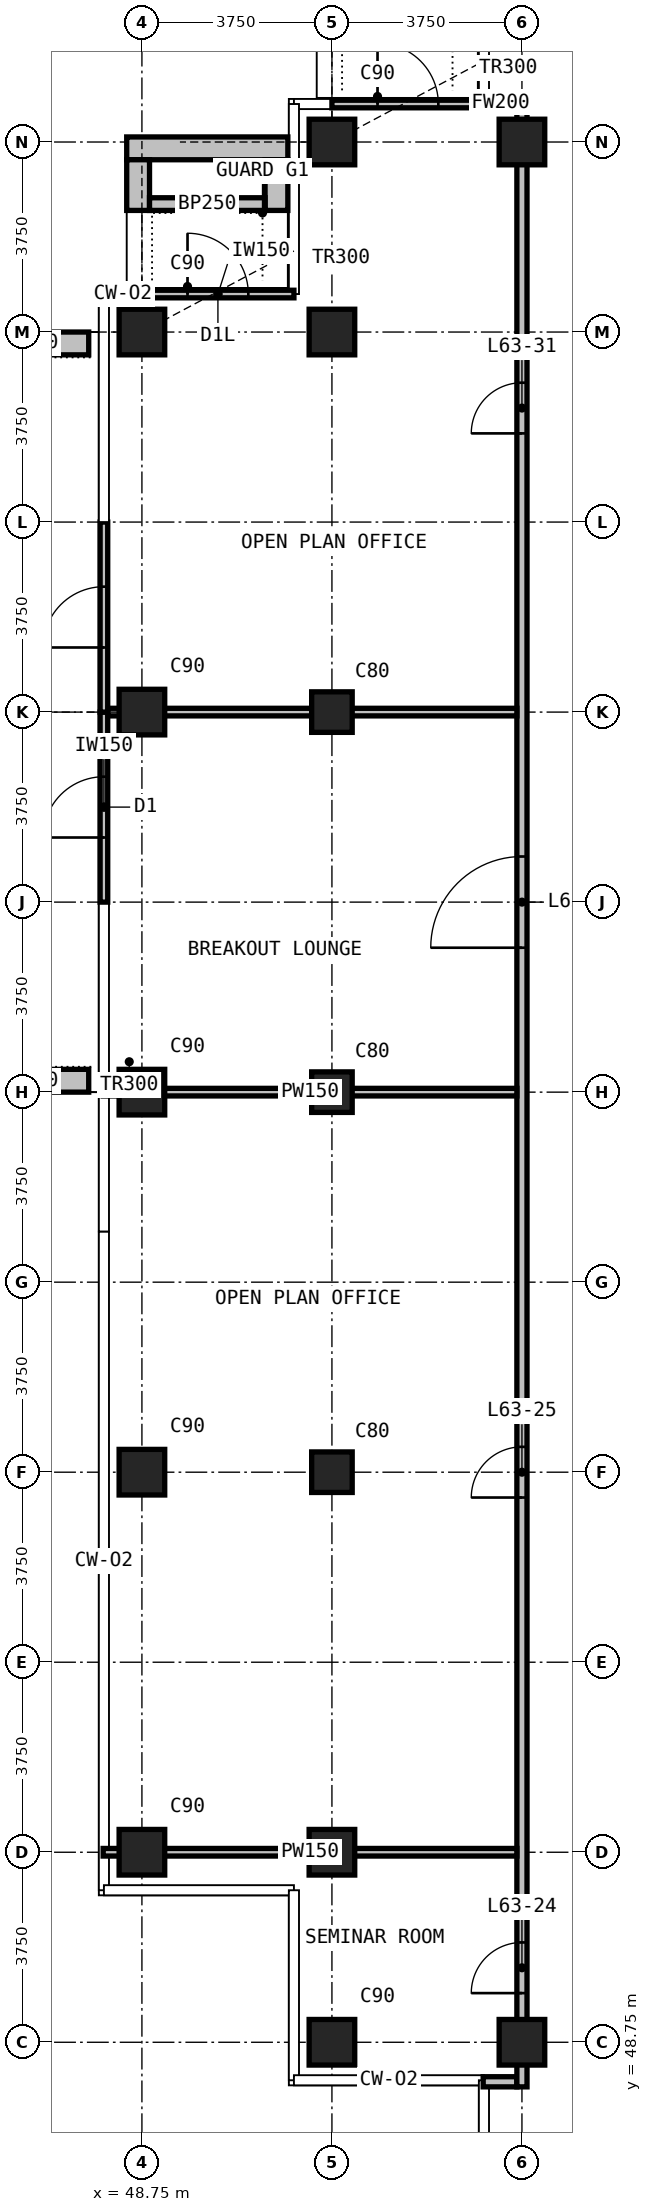
"""IFC4 building model, lengths in metres.
Left out: names, types, materials, properties, quantities, classifications, styles, units other than length and angle.
Written with IfcOpenShell. Run it as: python <this file> out.ifc"""

import sys

from ifc_helpers import new_model, si_unit, direction, frame, frame_2d, origin, origin_2d, place, context, subcontext, project, spatial, rectangle, extrude, element, fill, save


model = new_model("IFC4")
c1 = context("Model", 3, precision=1e-05, world=origin(), true_north=direction((0.0, 1.0)))
c2 = subcontext(c1, "Body", "Model", "MODEL_VIEW")
j1 = project(units=[si_unit("LENGTHUNIT", "METRE"), si_unit("PLANEANGLEUNIT", "RADIAN")], contexts=[c1])
p1 = place(None, origin())
s1 = spatial("IfcSite", under=j1, at=p1, CompositionType="ELEMENT")
p2 = place(p1, origin())
s2 = spatial("IfcBuilding", under=s1, at=p2, CompositionType="ELEMENT")
p3 = place(p2, frame((0.0, 0.0, 242.7)))
s3 = spatial("IfcBuildingStorey", under=s2, at=p3, CompositionType="ELEMENT", Elevation=242.7)
for number, where, z_axis, x_axis in (
    (1, (48.75, 52.5, 0.0), (0.0, 0.0, 1.0), (1.0, 0.0, 0.0)),
    (2, (48.75, 60.0, 0.0), (0.0, 0.0, 1.0), (1.0, 0.0, 0.0)),
    (3, (48.75, 67.5, 0.0), (0.0, 0.0, 1.0), (1.0, 0.0, 0.0)),
    (4, (48.75, 75.0, 0.0), (0.0, 0.0, 1.0), (1.0, 0.0, 0.0)),
    (5, (48.75, 82.5, 0.0), (0.0, 0.0, 1.0), (1.0, 0.0, 0.0)),
    (6, (52.5, 48.75, 0.0), (0.0, 0.0, 1.0), (1.0, 0.0, 0.0)),
    (7, (52.5, 52.5, 0.0), (0.0, 0.0, 1.0), (1.0, 0.0, 0.0)),
):
    element("IfcColumn", number, at=place(p3, frame(where, z_axis=z_axis, x_axis=x_axis)), inside=s3, PredefinedType="COLUMN", context=c2, shape_type="SweptSolid", body=[
        extrude(rectangle(XDim=0.9, YDim=0.9, at=origin_2d()), origin(), (0.0, 0.0, 1.0), 3.6),
    ])
for number, where, z_axis, x_axis in (
    (8, (52.5, 60.0, 0.0), (0.0, 0.0, 1.0), (1.0, 0.0, 0.0)),
    (9, (52.5, 67.5, 0.0), (0.0, 0.0, 1.0), (1.0, 0.0, 0.0)),
    (10, (52.5, 75.0, 0.0), (0.0, 0.0, 1.0), (1.0, 0.0, 0.0)),
):
    element("IfcColumn", number, at=place(p3, frame(where, z_axis=z_axis, x_axis=x_axis)), inside=s3, PredefinedType="COLUMN", context=c2, shape_type="SweptSolid", body=[
        extrude(rectangle(XDim=0.8, YDim=0.8, at=origin_2d()), origin(), (0.0, 0.0, 1.0), 3.6),
    ])
for number, where, z_axis, x_axis in (
    (11, (52.5, 82.5, 0.0), (0.0, 0.0, 1.0), (1.0, 0.0, 0.0)),
    (12, (52.5, 86.25, 0.0), (0.0, 0.0, 1.0), (1.0, 0.0, 0.0)),
    (13, (56.25, 48.75, 0.0), (0.0, 0.0, 1.0), (1.0, 0.0, 0.0)),
    (14, (56.25, 86.25, 0.0), (0.0, 0.0, 1.0), (1.0, 0.0, 0.0)),
):
    element("IfcColumn", number, at=place(p3, frame(where, z_axis=z_axis, x_axis=x_axis)), inside=s3, PredefinedType="COLUMN", context=c2, shape_type="SweptSolid", body=[
        extrude(rectangle(XDim=0.9, YDim=0.9, at=origin_2d()), origin(), (0.0, 0.0, 1.0), 3.6),
    ])
p4 = place(p3, frame((52.5, 87.0, 0.0), z_axis=(0.0, 0.0, 1.0), x_axis=(1.0, 0.0, 0.0)))
e15 = element("IfcWall", 15, at=p4, inside=s3, PredefinedType="SOLIDWALL", context=c2, shape_type="SweptSolid", body=[
    extrude(rectangle(XDim=3.0, YDim=0.15, at=frame_2d((1.5, 0.0))), origin(), (0.0, 0.0, 1.0), 3.3),
])
p5 = place(p4, frame((0.9, 0.0, 0.0)))
e16 = element("IfcOpeningElement", 16, at=p5, cuts=e15, PredefinedType="OPENING", context=c2, shape_type="SweptSolid", body=[
    extrude(rectangle(XDim=1.2, YDim=2.0, at=frame_2d((0.6, 1.0))), frame((0.0, 0.085, 0.0), z_axis=(0.0, -1.0, 0.0), x_axis=(1.0, 0.0, 0.0)), (0.0, 0.0, 1.0), 0.17),
])
p6 = place(p3, frame((48.75, 83.25, 0.0), z_axis=(0.0, 0.0, 1.0), x_axis=(1.0, 0.0, 0.0)))
e17 = element("IfcWall", 17, at=p6, inside=s3, PredefinedType="SOLIDWALL", context=c2, shape_type="SweptSolid", body=[
    extrude(rectangle(XDim=3.0, YDim=0.15, at=frame_2d((1.5, 0.0))), origin(), (0.0, 0.0, 1.0), 3.3),
])
p7 = place(p6, frame((0.9, 0.0, 0.0)))
e18 = element("IfcOpeningElement", 18, at=p7, cuts=e17, PredefinedType="OPENING", context=c2, shape_type="SweptSolid", body=[
    extrude(rectangle(XDim=1.2, YDim=2.0, at=frame_2d((0.6, 1.0))), frame((0.0, 0.085, 0.0), z_axis=(0.0, -1.0, 0.0), x_axis=(1.0, 0.0, 0.0)), (0.0, 0.0, 1.0), 0.17),
])
p8 = place(p3, frame((48.0, 71.25, 0.0), z_axis=(0.0, 0.0, 1.0), x_axis=(0.0, 1.0, 0.0)))
e19 = element("IfcWall", 19, at=p8, inside=s3, PredefinedType="SOLIDWALL", context=c2, shape_type="SweptSolid", body=[
    extrude(rectangle(XDim=3.75, YDim=0.15, at=frame_2d((1.875, 0.0))), origin(), (0.0, 0.0, 1.0), 3.3),
])
p9 = place(p8, frame((1.275, 0.0, 0.0)))
e20 = element("IfcOpeningElement", 20, at=p9, cuts=e19, PredefinedType="OPENING", context=c2, shape_type="SweptSolid", body=[
    extrude(rectangle(XDim=1.2, YDim=2.4, at=frame_2d((0.6, 1.2))), frame((0.0, 0.085, 0.0), z_axis=(0.0, -1.0, 0.0), x_axis=(1.0, 0.0, 0.0)), (0.0, 0.0, 1.0), 0.17),
])
p10 = place(p3, frame((48.0, 75.0, 0.0), z_axis=(0.0, 0.0, 1.0), x_axis=(0.0, 1.0, 0.0)))
e21 = element("IfcWall", 21, at=p10, inside=s3, PredefinedType="SOLIDWALL", context=c2, shape_type="SweptSolid", body=[
    extrude(rectangle(XDim=3.75, YDim=0.15, at=frame_2d((1.875, 0.0))), origin(), (0.0, 0.0, 1.0), 3.3),
])
p11 = place(p10, frame((1.275, 0.0, 0.0)))
e22 = element("IfcOpeningElement", 22, at=p11, cuts=e21, PredefinedType="OPENING", context=c2, shape_type="SweptSolid", body=[
    extrude(rectangle(XDim=1.2, YDim=2.4, at=frame_2d((0.6, 1.2))), frame((0.0, 0.085, 0.0), z_axis=(0.0, -1.0, 0.0), x_axis=(1.0, 0.0, 0.0)), (0.0, 0.0, 1.0), 0.17),
])
p12 = place(p3, frame((48.45, 86.125, 0.0), z_axis=(0.0, 0.0, 1.0), x_axis=(1.0, 0.0, 0.0)))
e23 = element("IfcWall", 23, at=p12, inside=s3, PredefinedType="USERDEFINED", context=c2, shape_type="SweptSolid", body=[
    extrude(rectangle(XDim=3.18, YDim=0.45, at=frame_2d((1.59, 0.0))), origin(), (0.0, 0.0, 1.0), 1.1),
])
for number, where, z_axis, x_axis in (
    (24, (48.675, 84.9, 0.0), (0.0, 0.0, 1.0), (0.0, 1.0, 0.0)),
    (25, (51.405, 84.9, 0.0), (0.0, 0.0, 1.0), (0.0, 1.0, 0.0)),
):
    element("IfcWall", number, at=place(p3, frame(where, z_axis=z_axis, x_axis=x_axis)), inside=s3, PredefinedType="USERDEFINED", context=c2, shape_type="SweptSolid", body=[
        extrude(rectangle(XDim=1.0, YDim=0.45, at=frame_2d((0.5, 0.0))), origin(), (0.0, 0.0, 1.0), 1.1),
    ])
p13 = place(p3, frame((48.9, 85.025, 0.0), z_axis=(0.0, 0.0, 1.0), x_axis=(1.0, 0.0, 0.0)))
e26 = element("IfcWall", 26, at=p13, inside=s3, PredefinedType="USERDEFINED", context=c2, shape_type="SweptSolid", body=[
    extrude(rectangle(XDim=2.28, YDim=0.25, at=frame_2d((1.14, 0.0))), origin(), (0.0, 0.0, 1.0), 1.0),
])
for number, where, z_axis, x_axis in (
    (27, (47.7, 67.725, 0.0), (0.0, 0.0, 1.0), (-1.0, 0.0, 0.0)),
    (28, (47.7, 82.275, 0.0), (0.0, 0.0, 1.0), (-1.0, 0.0, 0.0)),
):
    element("IfcWall", number, at=place(p3, frame(where, z_axis=z_axis, x_axis=x_axis)), inside=s3, PredefinedType="USERDEFINED", context=c2, shape_type="SweptSolid", body=[
        extrude(rectangle(XDim=2.35, YDim=0.45, at=frame_2d((1.175, 0.0))), origin(), (0.0, 0.0, 1.0), 1.1),
    ])
p14 = place(p3, frame((55.485, 47.97, 0.0), z_axis=(0.0, 0.0, 1.0), x_axis=(1.0, 0.0, 0.0)))
e29 = element("IfcWall", 29, at=p14, inside=s3, PredefinedType="PARTITIONING", context=c2, shape_type="SweptSolid", body=[
    extrude(rectangle(XDim=0.665, YDim=0.2, at=frame_2d((0.333, 0.0))), origin(), (0.0, 0.0, 1.0), 3.3),
])
p15 = place(p3, frame((55.51, 87.03, 0.0), z_axis=(0.0, 0.0, 1.0), x_axis=(1.0, 0.0, 0.0)))
e30 = element("IfcWall", 30, at=p15, inside=s3, PredefinedType="PARTITIONING", context=c2, shape_type="SweptSolid", body=[
    extrude(rectangle(XDim=0.64, YDim=0.2, at=frame_2d((0.32, 0.0))), origin(), (0.0, 0.0, 1.0), 3.3),
])
p16 = place(p3, frame((56.25, 47.87, 0.0), z_axis=(0.0, 0.0, 1.0), x_axis=(0.0, 1.0, 0.0)))
e31 = element("IfcWall", 31, at=p16, inside=s3, PredefinedType="PARTITIONING", context=c2, shape_type="SweptSolid", body=[
    extrude(rectangle(XDim=39.26, YDim=0.2, at=frame_2d((19.63, 0.0))), origin(), (0.0, 0.0, 1.0), 3.3),
])
p17 = place(p16, frame((1.85, 0.0, 0.0)))
e32 = element("IfcOpeningElement", 32, at=p17, cuts=e31, PredefinedType="OPENING", context=c2, shape_type="SweptSolid", body=[
    extrude(rectangle(XDim=1.0, YDim=2.2, at=frame_2d((0.5, 1.1))), frame((0.0, 0.11, 0.0), z_axis=(0.0, -1.0, 0.0), x_axis=(1.0, 0.0, 0.0)), (0.0, 0.0, 1.0), 0.22),
])
p18 = place(p16, frame((11.63, 0.0, 0.0)))
e33 = element("IfcOpeningElement", 33, at=p18, cuts=e31, PredefinedType="OPENING", context=c2, shape_type="SweptSolid", body=[
    extrude(rectangle(XDim=1.0, YDim=2.2, at=frame_2d((0.5, 1.1))), frame((0.0, 0.11, 0.0), z_axis=(0.0, -1.0, 0.0), x_axis=(1.0, 0.0, 0.0)), (0.0, 0.0, 1.0), 0.22),
])
p19 = place(p16, frame((22.48, 0.0, 0.0)))
e34 = element("IfcOpeningElement", 34, at=p19, cuts=e31, PredefinedType="OPENING", context=c2, shape_type="SweptSolid", body=[
    extrude(rectangle(XDim=1.8, YDim=2.2, at=frame_2d((0.9, 1.1))), frame((0.0, 0.11, 0.0), z_axis=(0.0, -1.0, 0.0), x_axis=(1.0, 0.0, 0.0)), (0.0, 0.0, 1.0), 0.22),
])
p20 = place(p16, frame((32.63, 0.0, 0.0)))
e35 = element("IfcOpeningElement", 35, at=p20, cuts=e31, PredefinedType="OPENING", context=c2, shape_type="SweptSolid", body=[
    extrude(rectangle(XDim=1.0, YDim=2.2, at=frame_2d((0.5, 1.1))), frame((0.0, 0.11, 0.0), z_axis=(0.0, -1.0, 0.0), x_axis=(1.0, 0.0, 0.0)), (0.0, 0.0, 1.0), 0.22),
])
for number, where, z_axis, x_axis in (
    (36, (47.985, 52.5, 0.0), (0.0, 0.0, 1.0), (1.0, 0.0, 0.0)),
    (37, (47.985, 67.5, 0.0), (0.0, 0.0, 1.0), (1.0, 0.0, 0.0)),
):
    element("IfcWall", number, at=place(p3, frame(where, z_axis=z_axis, x_axis=x_axis)), inside=s3, PredefinedType="PARTITIONING", context=c2, shape_type="SweptSolid", body=[
        extrude(rectangle(XDim=8.165, YDim=0.15, at=frame_2d((4.083, 0.0))), origin(), (0.0, 0.0, 1.0), 3.3),
    ])
p21 = place(p3, frame((48.085, 75.0, 0.0), z_axis=(0.0, 0.0, 1.0), x_axis=(1.0, 0.0, 0.0)))
e38 = element("IfcWall", 38, at=p21, inside=s3, PredefinedType="PARTITIONING", context=c2, shape_type="SweptSolid", body=[
    extrude(rectangle(XDim=8.065, YDim=0.15, at=frame_2d((4.032, 0.0))), origin(), (0.0, 0.0, 1.0), 3.3),
])
p22 = place(p5, origin())
e39 = element("IfcDoor", 39, at=p22, inside=s3, OperationType="SINGLE_SWING_LEFT", PredefinedType="DOOR", context=c2, shape_type="SweptSolid", body=[
    extrude(rectangle(XDim=1.2, YDim=2.0, at=frame_2d((0.6, 1.0))), frame((0.0, 0.025, 0.0), z_axis=(0.0, -1.0, 0.0), x_axis=(1.0, 0.0, 0.0)), (0.0, 0.0, 1.0), 0.05),
])
fill(e16, e39)
p23 = place(p7, origin())
e40 = element("IfcDoor", 40, at=p23, inside=s3, OperationType="SINGLE_SWING_LEFT", PredefinedType="DOOR", context=c2, shape_type="SweptSolid", body=[
    extrude(rectangle(XDim=1.2, YDim=2.0, at=frame_2d((0.6, 1.0))), frame((0.0, 0.025, 0.0), z_axis=(0.0, -1.0, 0.0), x_axis=(1.0, 0.0, 0.0)), (0.0, 0.0, 1.0), 0.05),
])
fill(e18, e40)
p24 = place(p9, origin())
e41 = element("IfcDoor", 41, at=p24, inside=s3, OperationType="SINGLE_SWING_LEFT", PredefinedType="DOOR", context=c2, shape_type="SweptSolid", body=[
    extrude(rectangle(XDim=1.2, YDim=2.4, at=frame_2d((0.6, 1.2))), frame((0.0, 0.025, 0.0), z_axis=(0.0, -1.0, 0.0), x_axis=(1.0, 0.0, 0.0)), (0.0, 0.0, 1.0), 0.05),
])
fill(e20, e41)
p25 = place(p11, origin())
e42 = element("IfcDoor", 42, at=p25, inside=s3, OperationType="SINGLE_SWING_LEFT", PredefinedType="DOOR", context=c2, shape_type="SweptSolid", body=[
    extrude(rectangle(XDim=1.2, YDim=2.4, at=frame_2d((0.6, 1.2))), frame((0.0, 0.025, 0.0), z_axis=(0.0, -1.0, 0.0), x_axis=(1.0, 0.0, 0.0)), (0.0, 0.0, 1.0), 0.05),
])
fill(e22, e42)
p26 = place(p17, origin())
e43 = element("IfcDoor", 43, at=p26, inside=s3, OperationType="SINGLE_SWING_RIGHT", PredefinedType="DOOR", context=c2, shape_type="SweptSolid", body=[
    extrude(rectangle(XDim=1.0, YDim=2.2, at=frame_2d((0.5, 1.1))), frame((0.0, 0.025, 0.0), z_axis=(0.0, -1.0, 0.0), x_axis=(1.0, 0.0, 0.0)), (0.0, 0.0, 1.0), 0.05),
])
fill(e32, e43)
p27 = place(p18, origin())
e44 = element("IfcDoor", 44, at=p27, inside=s3, OperationType="SINGLE_SWING_LEFT", PredefinedType="DOOR", context=c2, shape_type="SweptSolid", body=[
    extrude(rectangle(XDim=1.0, YDim=2.2, at=frame_2d((0.5, 1.1))), frame((0.0, 0.025, 0.0), z_axis=(0.0, -1.0, 0.0), x_axis=(1.0, 0.0, 0.0)), (0.0, 0.0, 1.0), 0.05),
])
fill(e33, e44)
p28 = place(p19, origin())
e45 = element("IfcDoor", 45, at=p28, inside=s3, OperationType="DOUBLE_DOOR_SINGLE_SWING", PredefinedType="DOOR", context=c2, shape_type="SweptSolid", body=[
    extrude(rectangle(XDim=1.8, YDim=2.2, at=frame_2d((0.9, 1.1))), frame((0.0, 0.025, 0.0), z_axis=(0.0, -1.0, 0.0), x_axis=(1.0, 0.0, 0.0)), (0.0, 0.0, 1.0), 0.05),
])
fill(e34, e45)
p29 = place(p20, origin())
e46 = element("IfcDoor", 46, at=p29, inside=s3, OperationType="SINGLE_SWING_LEFT", PredefinedType="DOOR", context=c2, shape_type="SweptSolid", body=[
    extrude(rectangle(XDim=1.0, YDim=2.2, at=frame_2d((0.5, 1.1))), frame((0.0, 0.025, 0.0), z_axis=(0.0, -1.0, 0.0), x_axis=(1.0, 0.0, 0.0)), (0.0, 0.0, 1.0), 0.05),
])
fill(e35, e46)
save(model, sys.argv[1])
